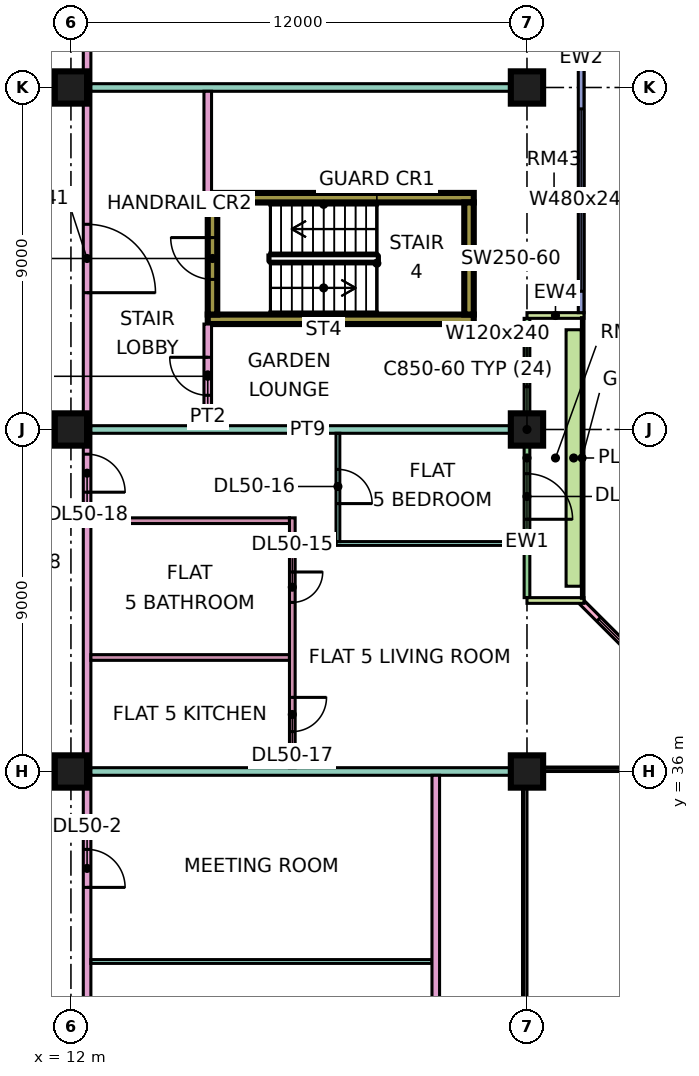
"""IFC4 building model, lengths in metres.
Left out: names, types, materials, properties, quantities, classifications, styles, units other than length and angle.
Written with IfcOpenShell. Run it as: python <this file> out.ifc"""

import sys

from ifc_helpers import new_model, si_unit, direction, frame, frame_2d, origin, origin_2d, place, context, subcontext, project, spatial, rectangle, extrude, element, fill, save


model = new_model("IFC4")
c1 = context("Model", 3, precision=1e-05, world=origin(), true_north=direction((0.0, 1.0)))
c2 = subcontext(c1, "Body", "Model", "MODEL_VIEW")
j1 = project(units=[si_unit("LENGTHUNIT", "METRE"), si_unit("PLANEANGLEUNIT", "RADIAN")], contexts=[c1])
p1 = place(None, origin())
s1 = spatial("IfcSite", under=j1, at=p1, CompositionType="ELEMENT")
p2 = place(p1, origin())
s2 = spatial("IfcBuilding", under=s1, at=p2, CompositionType="ELEMENT")
p3 = place(p2, frame((0.0, 0.0, 215.4)))
s3 = spatial("IfcBuildingStorey", under=s2, at=p3, CompositionType="ELEMENT", Elevation=215.4)
for number, where, z_axis, x_axis in (
    (1, (12.0, 36.0, 0.0), (0.0, 0.0, 1.0), (1.0, 0.0, 0.0)),
    (2, (12.0, 45.0, 0.0), (0.0, 0.0, 1.0), (1.0, 0.0, 0.0)),
    (3, (12.0, 54.0, 0.0), (0.0, 0.0, 1.0), (1.0, 0.0, 0.0)),
    (4, (24.0, 36.0, 0.0), (0.0, 0.0, 1.0), (1.0, 0.0, 0.0)),
    (5, (24.0, 45.0, 0.0), (0.0, 0.0, 1.0), (1.0, 0.0, 0.0)),
    (6, (24.0, 54.0, 0.0), (0.0, 0.0, 1.0), (1.0, 0.0, 0.0)),
):
    element("IfcColumn", number, at=place(p3, frame(where, z_axis=z_axis, x_axis=x_axis)), inside=s3, PredefinedType="COLUMN", context=c2, shape_type="SweptSolid", body=[
        extrude(rectangle(XDim=0.85, YDim=0.85, at=origin_2d()), origin(), (0.0, 0.0, 1.0), 3.75),
    ])
for number, where, z_axis, x_axis in (
    (7, (15.6, 47.9, 0.0), (0.0, 0.0, 1.0), (1.0, 0.0, 0.0)),
    (8, (15.6, 51.1, 0.0), (0.0, 0.0, 1.0), (1.0, 0.0, 0.0)),
):
    element("IfcWall", number, at=place(p3, frame(where, z_axis=z_axis, x_axis=x_axis)), inside=s3, PredefinedType="SHEAR", context=c2, shape_type="SweptSolid", body=[
        extrude(rectangle(XDim=7.0, YDim=0.25, at=frame_2d((3.5, 0.0))), origin(), (0.0, 0.0, 1.0), 3.75),
    ])
p4 = place(p3, frame((15.725, 48.025, 0.0), z_axis=(0.0, 0.0, 1.0), x_axis=(0.0, 1.0, 0.0)))
e9 = element("IfcWall", 9, at=p4, inside=s3, PredefinedType="SHEAR", context=c2, shape_type="SweptSolid", body=[
    extrude(rectangle(XDim=2.95, YDim=0.25, at=frame_2d((1.475, 0.0))), origin(), (0.0, 0.0, 1.0), 3.75),
])
p5 = place(p4, frame((0.925, 0.0, 0.0)))
e10 = element("IfcOpeningElement", 10, at=p5, cuts=e9, PredefinedType="OPENING", context=c2, shape_type="SweptSolid", body=[
    extrude(rectangle(XDim=1.1, YDim=2.2, at=frame_2d((0.55, 1.1))), frame((0.0, 0.135, 0.0), z_axis=(0.0, -1.0, 0.0), x_axis=(1.0, 0.0, 0.0)), (0.0, 0.0, 1.0), 0.27),
])
p6 = place(p3, frame((22.475, 48.025, 0.0), z_axis=(0.0, 0.0, 1.0), x_axis=(0.0, 1.0, 0.0)))
e11 = element("IfcWall", 11, at=p6, inside=s3, PredefinedType="SHEAR", context=c2, shape_type="SweptSolid", body=[
    extrude(rectangle(XDim=2.95, YDim=0.25, at=frame_2d((1.475, 0.0))), origin(), (0.0, 0.0, 1.0), 3.75),
])
p7 = place(p3, frame((28.447, 37.447, 0.0), z_axis=(0.0, 0.0, 1.0), x_axis=(-0.707106781187, 0.707106781187, 0.0)))
e12 = element("IfcWall", 12, at=p7, inside=s3, PredefinedType="SOLIDWALL", context=c2, shape_type="SweptSolid", body=[
    extrude(rectangle(XDim=4.243, YDim=0.15, at=frame_2d((2.121, 0.0))), origin(), (0.0, 0.0, 1.0), 3.35),
])
p8 = place(p7, frame((0.621, 0.0, 0.45)))
e13 = element("IfcOpeningElement", 13, at=p8, cuts=e12, PredefinedType="OPENING", context=c2, shape_type="SweptSolid", body=[
    extrude(rectangle(XDim=3.0, YDim=2.4, at=frame_2d((1.5, 1.2))), frame((0.0, 0.085, 0.0), z_axis=(0.0, -1.0, 0.0), x_axis=(1.0, 0.0, 0.0)), (0.0, 0.0, 1.0), 0.17),
])
p9 = place(p3, frame((24.0, 40.575, 0.0), z_axis=(0.0, 0.0, 1.0), x_axis=(0.0, 1.0, 0.0)))
e14 = element("IfcWall", 14, at=p9, inside=s3, PredefinedType="SOLIDWALL", context=c2, shape_type="SweptSolid", body=[
    extrude(rectangle(XDim=7.35, YDim=0.15, at=frame_2d((3.675, 0.0))), origin(), (0.0, 0.0, 1.0), 3.35),
])
p10 = place(p9, frame((2.062, 0.0, 0.0)))
e15 = element("IfcOpeningElement", 15, at=p10, cuts=e14, PredefinedType="OPENING", context=c2, shape_type="SweptSolid", body=[
    extrude(rectangle(XDim=1.2, YDim=2.4, at=frame_2d((0.6, 1.2))), frame((0.0, 0.085, 0.0), z_axis=(0.0, -1.0, 0.0), x_axis=(1.0, 0.0, 0.0)), (0.0, 0.0, 1.0), 0.17),
])
p11 = place(p9, frame((5.55, 0.0, 0.45)))
e16 = element("IfcOpeningElement", 16, at=p11, cuts=e14, PredefinedType="OPENING", context=c2, shape_type="SweptSolid", body=[
    extrude(rectangle(XDim=1.2, YDim=2.4, at=frame_2d((0.6, 1.2))), frame((0.0, 0.085, 0.0), z_axis=(0.0, -1.0, 0.0), x_axis=(1.0, 0.0, 0.0)), (0.0, 0.0, 1.0), 0.17),
])
for number, where, z_axis, x_axis in (
    (17, (25.5, 40.5, 0.0), (0.0, 0.0, 1.0), (-1.0, 0.0, 0.0)),
    (18, (25.5, 48.0, 0.0), (0.0, 0.0, 1.0), (-1.0, 0.0, 0.0)),
):
    element("IfcWall", number, at=place(p3, frame(where, z_axis=z_axis, x_axis=x_axis)), inside=s3, PredefinedType="SOLIDWALL", context=c2, shape_type="SweptSolid", body=[
        extrude(rectangle(XDim=1.5, YDim=0.15, at=frame_2d((0.75, 0.0))), origin(), (0.0, 0.0, 1.0), 3.35),
    ])
p12 = place(p3, frame((25.425, 48.075, 0.0), z_axis=(0.0, 0.0, 1.0), x_axis=(0.0, 1.0, 0.0)))
e19 = element("IfcWall", 19, at=p12, inside=s3, PredefinedType="SOLIDWALL", context=c2, shape_type="SweptSolid", body=[
    extrude(rectangle(XDim=13.425, YDim=0.15, at=frame_2d((6.712, 0.0))), origin(), (0.0, 0.0, 1.0), 3.35),
])
p13 = place(p12, frame((0.562, 0.0, 0.45)))
e20 = element("IfcOpeningElement", 20, at=p13, cuts=e19, PredefinedType="OPENING", context=c2, shape_type="SweptSolid", body=[
    extrude(rectangle(XDim=4.8, YDim=2.4, at=frame_2d((2.4, 1.2))), frame((0.0, 0.085, 0.0), z_axis=(0.0, -1.0, 0.0), x_axis=(1.0, 0.0, 0.0)), (0.0, 0.0, 1.0), 0.17),
])
p14 = place(p12, frame((7.425, 0.0, 0.45)))
e21 = element("IfcOpeningElement", 21, at=p14, cuts=e19, PredefinedType="OPENING", context=c2, shape_type="SweptSolid", body=[
    extrude(rectangle(XDim=3.0, YDim=2.4, at=frame_2d((1.5, 1.2))), frame((0.0, 0.085, 0.0), z_axis=(0.0, -1.0, 0.0), x_axis=(1.0, 0.0, 0.0)), (0.0, 0.0, 1.0), 0.17),
])
p15 = place(p12, frame((12.225, 0.0, 0.45)))
e22 = element("IfcOpeningElement", 22, at=p15, cuts=e19, PredefinedType="OPENING", context=c2, shape_type="SweptSolid", body=[
    extrude(rectangle(XDim=0.9, YDim=2.4, at=frame_2d((0.45, 1.2))), frame((0.0, 0.085, 0.0), z_axis=(0.0, -1.0, 0.0), x_axis=(1.0, 0.0, 0.0)), (0.0, 0.0, 1.0), 0.17),
])
p16 = place(p3, frame((25.229, 40.875, 0.0), z_axis=(0.0, 0.0, 1.0), x_axis=(0.0, 1.0, 0.0)))
e23 = element("IfcWall", 23, at=p16, inside=s3, PredefinedType="SOLIDWALL", context=c2, shape_type="SweptSolid", body=[
    extrude(rectangle(XDim=6.75, YDim=0.4, at=frame_2d((3.375, 0.0))), origin(), (0.0, 0.0, 1.0), 0.7),
])
p17 = place(p3, frame((12.425, 20.0, 0.0), z_axis=(0.0, 0.0, 1.0), x_axis=(0.0, 1.0, 0.0)))
e24 = element("IfcWall", 24, at=p17, inside=s3, PredefinedType="PARTITIONING", context=c2, shape_type="SweptSolid", body=[
    extrude(rectangle(XDim=42.926, YDim=0.2, at=frame_2d((21.463, 0.0))), origin(), (0.0, 0.0, 1.0), 3.35),
])
p18 = place(p17, frame((7.0, 0.0, 0.0)))
e25 = element("IfcOpeningElement", 25, at=p18, cuts=e24, PredefinedType="OPENING", context=c2, shape_type="SweptSolid", body=[
    extrude(rectangle(XDim=1.0, YDim=2.1, at=frame_2d((0.5, 1.05))), frame((0.0, 0.11, 0.0), z_axis=(0.0, -1.0, 0.0), x_axis=(1.0, 0.0, 0.0)), (0.0, 0.0, 1.0), 0.22),
])
p19 = place(p17, frame((12.95, 0.0, 0.0)))
e26 = element("IfcOpeningElement", 26, at=p19, cuts=e24, PredefinedType="OPENING", context=c2, shape_type="SweptSolid", body=[
    extrude(rectangle(XDim=1.0, YDim=2.1, at=frame_2d((0.5, 1.05))), frame((0.0, 0.11, 0.0), z_axis=(0.0, -1.0, 0.0), x_axis=(1.0, 0.0, 0.0)), (0.0, 0.0, 1.0), 0.22),
])
p20 = place(p17, frame((23.35, 0.0, 0.0)))
e27 = element("IfcOpeningElement", 27, at=p20, cuts=e24, PredefinedType="OPENING", context=c2, shape_type="SweptSolid", body=[
    extrude(rectangle(XDim=1.0, YDim=2.1, at=frame_2d((0.5, 1.05))), frame((0.0, 0.11, 0.0), z_axis=(0.0, -1.0, 0.0), x_axis=(1.0, 0.0, 0.0)), (0.0, 0.0, 1.0), 0.22),
])
p21 = place(p17, frame((35.2, 0.0, 0.0)))
e28 = element("IfcOpeningElement", 28, at=p21, cuts=e24, PredefinedType="OPENING", context=c2, shape_type="SweptSolid", body=[
    extrude(rectangle(XDim=1.0, YDim=2.1, at=frame_2d((0.5, 1.05))), frame((0.0, 0.11, 0.0), z_axis=(0.0, -1.0, 0.0), x_axis=(1.0, 0.0, 0.0)), (0.0, 0.0, 1.0), 0.22),
])
p22 = place(p17, frame((1.15, 0.0, 0.0)))
e29 = element("IfcOpeningElement", 29, at=p22, cuts=e24, PredefinedType="OPENING", context=c2, shape_type="SweptSolid", body=[
    extrude(rectangle(XDim=1.8, YDim=2.1, at=frame_2d((0.9, 1.05))), frame((0.0, 0.11, 0.0), z_axis=(0.0, -1.0, 0.0), x_axis=(1.0, 0.0, 0.0)), (0.0, 0.0, 1.0), 0.22),
])
p23 = place(p17, frame((28.6, 0.0, 0.0)))
e30 = element("IfcOpeningElement", 30, at=p23, cuts=e24, PredefinedType="OPENING", context=c2, shape_type="SweptSolid", body=[
    extrude(rectangle(XDim=1.8, YDim=2.1, at=frame_2d((0.9, 1.05))), frame((0.0, 0.11, 0.0), z_axis=(0.0, -1.0, 0.0), x_axis=(1.0, 0.0, 0.0)), (0.0, 0.0, 1.0), 0.22),
])
p24 = place(p3, frame((12.525, 31.0, 0.0), z_axis=(0.0, 0.0, 1.0), x_axis=(1.0, 0.0, 0.0)))
e31 = element("IfcWall", 31, at=p24, inside=s3, PredefinedType="PARTITIONING", context=c2, shape_type="SweptSolid", body=[
    extrude(rectangle(XDim=8.975, YDim=0.1, at=frame_2d((4.488, 0.0))), origin(), (0.0, 0.0, 1.0), 3.35),
])
p25 = place(p3, frame((12.525, 36.0, 0.0), z_axis=(0.0, 0.0, 1.0), x_axis=(1.0, 0.0, 0.0)))
e32 = element("IfcWall", 32, at=p25, inside=s3, PredefinedType="PARTITIONING", context=c2, shape_type="SweptSolid", body=[
    extrude(rectangle(XDim=11.475, YDim=0.2, at=frame_2d((5.738, 0.0))), origin(), (0.0, 0.0, 1.0), 3.35),
])
for number, where, z_axis, x_axis in (
    (33, (12.525, 39.0, 0.0), (0.0, 0.0, 1.0), (1.0, 0.0, 0.0)),
    (34, (12.525, 42.6, 0.0), (0.0, 0.0, 1.0), (1.0, 0.0, 0.0)),
):
    element("IfcWall", number, at=place(p3, frame(where, z_axis=z_axis, x_axis=x_axis)), inside=s3, PredefinedType="PARTITIONING", context=c2, shape_type="SweptSolid", body=[
        extrude(rectangle(XDim=5.225, YDim=0.15, at=frame_2d((2.613, 0.0))), origin(), (0.0, 0.0, 1.0), 3.35),
    ])
p26 = place(p3, frame((12.525, 45.0, 0.0), z_axis=(0.0, 0.0, 1.0), x_axis=(1.0, 0.0, 0.0)))
e35 = element("IfcWall", 35, at=p26, inside=s3, PredefinedType="PARTITIONING", context=c2, shape_type="SweptSolid", body=[
    extrude(rectangle(XDim=11.401, YDim=0.2, at=frame_2d((5.701, 0.0))), origin(), (0.0, 0.0, 1.0), 3.35),
])
p27 = place(p3, frame((12.525, 54.0, 0.0), z_axis=(0.0, 0.0, 1.0), x_axis=(1.0, 0.0, 0.0)))
e36 = element("IfcWall", 36, at=p27, inside=s3, PredefinedType="PARTITIONING", context=c2, shape_type="SweptSolid", body=[
    extrude(rectangle(XDim=11.475, YDim=0.2, at=frame_2d((5.738, 0.0))), origin(), (0.0, 0.0, 1.0), 3.35),
])
p28 = place(p3, frame((15.6, 45.1, 0.0), z_axis=(0.0, 0.0, 1.0), x_axis=(0.0, 1.0, 0.0)))
e37 = element("IfcWall", 37, at=p28, inside=s3, PredefinedType="PARTITIONING", context=c2, shape_type="SweptSolid", body=[
    extrude(rectangle(XDim=2.675, YDim=0.2, at=frame_2d((1.337, 0.0))), origin(), (0.0, 0.0, 1.0), 3.35),
])
p29 = place(p28, frame((0.8, 0.0, 0.0)))
e38 = element("IfcOpeningElement", 38, at=p29, cuts=e37, PredefinedType="OPENING", context=c2, shape_type="SweptSolid", body=[
    extrude(rectangle(XDim=1.0, YDim=2.1, at=frame_2d((0.5, 1.05))), frame((0.0, 0.11, 0.0), z_axis=(0.0, -1.0, 0.0), x_axis=(1.0, 0.0, 0.0)), (0.0, 0.0, 1.0), 0.22),
])
p30 = place(p3, frame((15.6, 51.225, 0.0), z_axis=(0.0, 0.0, 1.0), x_axis=(0.0, 1.0, 0.0)))
e39 = element("IfcWall", 39, at=p30, inside=s3, PredefinedType="PARTITIONING", context=c2, shape_type="SweptSolid", body=[
    extrude(rectangle(XDim=2.675, YDim=0.2, at=frame_2d((1.337, 0.0))), origin(), (0.0, 0.0, 1.0), 3.35),
])
p31 = place(p3, frame((17.825, 36.1, 0.0), z_axis=(0.0, 0.0, 1.0), x_axis=(0.0, 1.0, 0.0)))
e40 = element("IfcWall", 40, at=p31, inside=s3, PredefinedType="PARTITIONING", context=c2, shape_type="SweptSolid", body=[
    extrude(rectangle(XDim=6.575, YDim=0.15, at=frame_2d((3.288, 0.0))), origin(), (0.0, 0.0, 1.0), 3.35),
])
p32 = place(p31, frame((4.35, 0.0, 0.0)))
e41 = element("IfcOpeningElement", 41, at=p32, cuts=e40, PredefinedType="OPENING", context=c2, shape_type="SweptSolid", body=[
    extrude(rectangle(XDim=0.8, YDim=2.1, at=frame_2d((0.4, 1.05))), frame((0.0, 0.085, 0.0), z_axis=(0.0, -1.0, 0.0), x_axis=(1.0, 0.0, 0.0)), (0.0, 0.0, 1.0), 0.17),
])
p33 = place(p31, frame((0.95, 0.0, 0.0)))
e42 = element("IfcOpeningElement", 42, at=p33, cuts=e40, PredefinedType="OPENING", context=c2, shape_type="SweptSolid", body=[
    extrude(rectangle(XDim=0.9, YDim=2.1, at=frame_2d((0.45, 1.05))), frame((0.0, 0.085, 0.0), z_axis=(0.0, -1.0, 0.0), x_axis=(1.0, 0.0, 0.0)), (0.0, 0.0, 1.0), 0.17),
])
p34 = place(p3, frame((18.975, 42.0, 0.0), z_axis=(0.0, 0.0, 1.0), x_axis=(1.0, 0.0, 0.0)))
e43 = element("IfcWall", 43, at=p34, inside=s3, PredefinedType="PARTITIONING", context=c2, shape_type="SweptSolid", body=[
    extrude(rectangle(XDim=4.951, YDim=0.1, at=frame_2d((2.476, 0.0))), origin(), (0.0, 0.0, 1.0), 3.35),
])
p35 = place(p3, frame((19.025, 42.05, 0.0), z_axis=(0.0, 0.0, 1.0), x_axis=(0.0, 1.0, 0.0)))
e44 = element("IfcWall", 44, at=p35, inside=s3, PredefinedType="PARTITIONING", context=c2, shape_type="SweptSolid", body=[
    extrude(rectangle(XDim=2.85, YDim=0.1, at=frame_2d((1.425, 0.0))), origin(), (0.0, 0.0, 1.0), 3.35),
])
p36 = place(p35, frame((1.0, 0.0, 0.0)))
e45 = element("IfcOpeningElement", 45, at=p36, cuts=e44, PredefinedType="OPENING", context=c2, shape_type="SweptSolid", body=[
    extrude(rectangle(XDim=0.9, YDim=2.1, at=frame_2d((0.45, 1.05))), frame((0.0, 0.06, 0.0), z_axis=(0.0, -1.0, 0.0), x_axis=(1.0, 0.0, 0.0)), (0.0, 0.0, 1.0), 0.12),
])
p37 = place(p3, frame((21.6, 23.9, 0.0), z_axis=(0.0, 0.0, 1.0), x_axis=(0.0, 1.0, 0.0)))
e46 = element("IfcWall", 46, at=p37, inside=s3, PredefinedType="PARTITIONING", context=c2, shape_type="SweptSolid", body=[
    extrude(rectangle(XDim=12.0, YDim=0.2, at=frame_2d((6.0, 0.0))), origin(), (0.0, 0.0, 1.0), 3.35),
])
p38 = place(p8, origin())
e47 = element("IfcWindow", 47, at=p38, inside=s3, PartitioningType="SINGLE_PANEL", PredefinedType="WINDOW", context=c2, shape_type="SweptSolid", body=[
    extrude(rectangle(XDim=3.0, YDim=2.4, at=frame_2d((1.5, 1.2))), frame((0.0, 0.03, 0.0), z_axis=(0.0, -1.0, 0.0), x_axis=(1.0, 0.0, 0.0)), (0.0, 0.0, 1.0), 0.06),
])
fill(e13, e47)
p39 = place(p10, frame((1.2, 0.0, 0.0), z_axis=(0.0, 0.0, 1.0), x_axis=(-1.0, 0.0, 0.0)))
e48 = element("IfcDoor", 48, at=p39, inside=s3, OperationType="DOUBLE_DOOR_SINGLE_SWING", PredefinedType="DOOR", context=c2, shape_type="SweptSolid", body=[
    extrude(rectangle(XDim=1.2, YDim=2.4, at=frame_2d((0.6, 1.2))), frame((0.0, 0.025, 0.0), z_axis=(0.0, -1.0, 0.0), x_axis=(1.0, 0.0, 0.0)), (0.0, 0.0, 1.0), 0.05),
])
fill(e15, e48)
p40 = place(p11, origin())
e49 = element("IfcWindow", 49, at=p40, inside=s3, PartitioningType="SINGLE_PANEL", PredefinedType="WINDOW", context=c2, shape_type="SweptSolid", body=[
    extrude(rectangle(XDim=1.2, YDim=2.4, at=frame_2d((0.6, 1.2))), frame((0.0, 0.03, 0.0), z_axis=(0.0, -1.0, 0.0), x_axis=(1.0, 0.0, 0.0)), (0.0, 0.0, 1.0), 0.06),
])
fill(e16, e49)
p41 = place(p13, origin())
e50 = element("IfcWindow", 50, at=p41, inside=s3, PartitioningType="SINGLE_PANEL", PredefinedType="WINDOW", context=c2, shape_type="SweptSolid", body=[
    extrude(rectangle(XDim=4.8, YDim=2.4, at=frame_2d((2.4, 1.2))), frame((0.0, 0.03, 0.0), z_axis=(0.0, -1.0, 0.0), x_axis=(1.0, 0.0, 0.0)), (0.0, 0.0, 1.0), 0.06),
])
fill(e20, e50)
p42 = place(p5, frame((1.1, 0.0, 0.0), z_axis=(0.0, 0.0, 1.0), x_axis=(-1.0, 0.0, 0.0)))
e51 = element("IfcDoor", 51, at=p42, inside=s3, OperationType="SINGLE_SWING_RIGHT", PredefinedType="DOOR", context=c2, shape_type="SweptSolid", body=[
    extrude(rectangle(XDim=1.1, YDim=2.2, at=frame_2d((0.55, 1.1))), frame((0.0, 0.025, 0.0), z_axis=(0.0, -1.0, 0.0), x_axis=(1.0, 0.0, 0.0)), (0.0, 0.0, 1.0), 0.05),
])
fill(e10, e51)
p43 = place(p19, frame((1.0, 0.0, 0.0), z_axis=(0.0, 0.0, 1.0), x_axis=(-1.0, 0.0, 0.0)))
e52 = element("IfcDoor", 52, at=p43, inside=s3, OperationType="SINGLE_SWING_LEFT", PredefinedType="DOOR", context=c2, shape_type="SweptSolid", body=[
    extrude(rectangle(XDim=1.0, YDim=2.1, at=frame_2d((0.5, 1.05))), frame((0.0, 0.025, 0.0), z_axis=(0.0, -1.0, 0.0), x_axis=(1.0, 0.0, 0.0)), (0.0, 0.0, 1.0), 0.05),
])
fill(e26, e52)
p44 = place(p32, origin())
e53 = element("IfcDoor", 53, at=p44, inside=s3, OperationType="SINGLE_SWING_RIGHT", PredefinedType="DOOR", context=c2, shape_type="SweptSolid", body=[
    extrude(rectangle(XDim=0.8, YDim=2.1, at=frame_2d((0.4, 1.05))), frame((0.0, 0.025, 0.0), z_axis=(0.0, -1.0, 0.0), x_axis=(1.0, 0.0, 0.0)), (0.0, 0.0, 1.0), 0.05),
])
fill(e41, e53)
p45 = place(p36, frame((0.9, 0.0, 0.0), z_axis=(0.0, 0.0, 1.0), x_axis=(-1.0, 0.0, 0.0)))
e54 = element("IfcDoor", 54, at=p45, inside=s3, OperationType="SINGLE_SWING_LEFT", PredefinedType="DOOR", context=c2, shape_type="SweptSolid", body=[
    extrude(rectangle(XDim=0.9, YDim=2.1, at=frame_2d((0.45, 1.05))), frame((0.0, 0.025, 0.0), z_axis=(0.0, -1.0, 0.0), x_axis=(1.0, 0.0, 0.0)), (0.0, 0.0, 1.0), 0.05),
])
fill(e45, e54)
p46 = place(p33, origin())
e55 = element("IfcDoor", 55, at=p46, inside=s3, OperationType="SINGLE_SWING_RIGHT", PredefinedType="DOOR", context=c2, shape_type="SweptSolid", body=[
    extrude(rectangle(XDim=0.9, YDim=2.1, at=frame_2d((0.45, 1.05))), frame((0.0, 0.025, 0.0), z_axis=(0.0, -1.0, 0.0), x_axis=(1.0, 0.0, 0.0)), (0.0, 0.0, 1.0), 0.05),
])
fill(e42, e55)
p47 = place(p20, frame((1.0, 0.0, 0.0), z_axis=(0.0, 0.0, 1.0), x_axis=(-1.0, 0.0, 0.0)))
e56 = element("IfcDoor", 56, at=p47, inside=s3, OperationType="SINGLE_SWING_LEFT", PredefinedType="DOOR", context=c2, shape_type="SweptSolid", body=[
    extrude(rectangle(XDim=1.0, YDim=2.1, at=frame_2d((0.5, 1.05))), frame((0.0, 0.025, 0.0), z_axis=(0.0, -1.0, 0.0), x_axis=(1.0, 0.0, 0.0)), (0.0, 0.0, 1.0), 0.05),
])
fill(e27, e56)
p48 = place(p23, frame((1.8, 0.0, 0.0), z_axis=(0.0, 0.0, 1.0), x_axis=(-1.0, 0.0, 0.0)))
e57 = element("IfcDoor", 57, at=p48, inside=s3, OperationType="DOUBLE_DOOR_SINGLE_SWING", PredefinedType="DOOR", context=c2, shape_type="SweptSolid", body=[
    extrude(rectangle(XDim=1.8, YDim=2.1, at=frame_2d((0.9, 1.05))), frame((0.0, 0.025, 0.0), z_axis=(0.0, -1.0, 0.0), x_axis=(1.0, 0.0, 0.0)), (0.0, 0.0, 1.0), 0.05),
])
fill(e30, e57)
p49 = place(p29, frame((1.0, 0.0, 0.0), z_axis=(0.0, 0.0, 1.0), x_axis=(-1.0, 0.0, 0.0)))
e58 = element("IfcDoor", 58, at=p49, inside=s3, OperationType="SINGLE_SWING_RIGHT", PredefinedType="DOOR", context=c2, shape_type="SweptSolid", body=[
    extrude(rectangle(XDim=1.0, YDim=2.1, at=frame_2d((0.5, 1.05))), frame((0.0, 0.025, 0.0), z_axis=(0.0, -1.0, 0.0), x_axis=(1.0, 0.0, 0.0)), (0.0, 0.0, 1.0), 0.05),
])
fill(e38, e58)
save(model, sys.argv[1])
